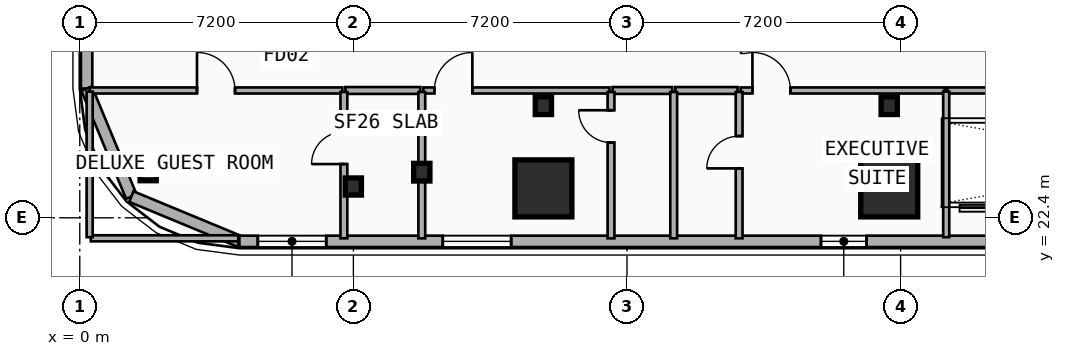
"""IFC4 building model, lengths in metres.
Left out: names, types, materials, properties, quantities, classifications, styles, units other than length and angle.
Written with IfcOpenShell. Run it as: python <this file> out.ifc"""

import sys

from ifc_helpers import new_model, si_unit, direction, frame, frame_2d, origin, origin_2d, place, context, subcontext, project, spatial, rectangle, i_section, extrude, element, fill, save


model = new_model("IFC4")
c1 = context("Model", 3, precision=1e-05, world=origin(), true_north=direction((0.0, 1.0)))
c2 = subcontext(c1, "Body", "Model", "MODEL_VIEW")
j1 = project(units=[si_unit("LENGTHUNIT", "METRE"), si_unit("PLANEANGLEUNIT", "RADIAN")], contexts=[c1])
p1 = place(None, origin())
s1 = spatial("IfcSite", under=j1, at=p1, CompositionType="ELEMENT")
p2 = place(p1, origin())
s2 = spatial("IfcBuilding", under=s1, at=p2, CompositionType="ELEMENT")
p3 = place(p2, frame((0.0, 0.0, 32.5)))
s3 = spatial("IfcBuildingStorey", under=s2, at=p3, CompositionType="ELEMENT", Elevation=32.5)
for number, where, z_axis, x_axis in (
    (1, (12.2, 25.35, 0.0), (0.0, 0.0, 1.0), (1.0, 0.0, 0.0)),
    (2, (21.3, 25.35, 0.0), (0.0, 0.0, 1.0), (1.0, 0.0, 0.0)),
):
    element("IfcColumn", number, at=place(p3, frame(where, z_axis=z_axis, x_axis=x_axis)), inside=s3, PredefinedType="COLUMN", context=c2, shape_type="SweptSolid", body=[
        extrude(i_section(OverallWidth=0.428, OverallDepth=0.465, WebThickness=0.045, FlangeThickness=0.073, FilletRadius=0.015, at=origin_2d()), origin(), (0.0, 0.0, 1.0), 3.5),
    ])
for number, where, z_axis, x_axis in (
    (3, (12.2, 23.283, 0.0), (0.0, -0.09, 0.996), (1.0, 0.0, 0.0)),
    (4, (21.3, 23.283, 0.0), (0.0, -0.09, 0.996), (1.0, 0.0, 0.0)),
):
    element("IfcColumn", number, at=place(p3, frame(where, z_axis=z_axis, x_axis=x_axis)), inside=s3, PredefinedType="COLUMN", context=c2, shape_type="SweptSolid", body=[
        extrude(rectangle(XDim=1.5, YDim=1.5, at=origin_2d()), origin(), (0.0, 0.0, 1.0), 3.514),
    ])
p4 = place(p3, frame((9.0, 23.6, 0.0), z_axis=(0.0, 0.0, 1.0), x_axis=(1.0, 0.0, 0.0)))
e5 = element("IfcColumn", 5, at=p4, inside=s3, PredefinedType="COLUMN", context=c2, shape_type="SweptSolid", body=[
    extrude(i_section(OverallWidth=0.428, OverallDepth=0.465, WebThickness=0.045, FlangeThickness=0.073, FilletRadius=0.015, at=origin_2d()), origin(), (0.0, 0.0, 1.0), 3.5),
])
p5 = place(p3, frame((1.8, 23.6, 0.0), z_axis=(0.0, 0.0, 1.0), x_axis=(1.0, 0.0, 0.0)))
e6 = element("IfcColumn", 6, at=p5, inside=s3, PredefinedType="COLUMN", context=c2, shape_type="SweptSolid", body=[
    extrude(i_section(OverallWidth=0.424, OverallDepth=0.45, WebThickness=0.041, FlangeThickness=0.065, FilletRadius=0.015, at=origin_2d()), origin(), (0.0, 0.0, 1.0), 3.5),
])
p6 = place(p3, frame((7.2, 23.32, 0.0), z_axis=(0.0, -0.079891690793, 0.996803550226), x_axis=(1.0, 0.0, 0.0)))
e7 = element("IfcColumn", 7, at=p6, inside=s3, PredefinedType="COLUMN", context=c2, shape_type="SweptSolid", body=[
    extrude(i_section(OverallWidth=0.424, OverallDepth=0.45, WebThickness=0.041, FlangeThickness=0.065, FilletRadius=0.015, at=origin_2d()), origin(), (0.0, 0.0, 1.0), 3.511),
])
p7 = place(p3, frame((0.18, 25.8, 0.0), z_axis=(0.0, 0.0, 1.0), x_axis=(0.0, 1.0, 0.0)))
e8 = element("IfcWall", 8, at=p7, inside=s3, PredefinedType="SOLIDWALL", context=c2, shape_type="SweptSolid", body=[
    extrude(rectangle(XDim=15.2, YDim=0.3, at=frame_2d((7.6, 0.0))), origin(), (0.0, 0.0, 1.0), 3.24),
])
p8 = place(p7, frame((2.67, 0.0, 0.48)))
e9 = element("IfcOpeningElement", 9, at=p8, cuts=e8, PredefinedType="OPENING", context=c2, shape_type="SweptSolid", body=[
    extrude(rectangle(XDim=1.4, YDim=1.8, at=frame_2d((0.7, 0.9))), frame((0.0, 0.16, 0.0), z_axis=(0.0, -1.0, 0.0), x_axis=(1.0, 0.0, 0.0)), (0.0, 0.0, 1.0), 0.32),
])
p9 = place(p7, frame((7.709, 0.0, 0.48)))
e10 = element("IfcOpeningElement", 10, at=p9, cuts=e8, PredefinedType="OPENING", context=c2, shape_type="SweptSolid", body=[
    extrude(rectangle(XDim=1.4, YDim=1.8, at=frame_2d((0.7, 0.9))), frame((0.0, 0.16, 0.0), z_axis=(0.0, -1.0, 0.0), x_axis=(1.0, 0.0, 0.0)), (0.0, 0.0, 1.0), 0.32),
])
for number, where, z_axis, x_axis in (
    (11, (1.357, 22.958, 0.0), (0.0, 0.0, 1.0), (-0.383, 0.924, 0.0)),
    (12, (4.2, 21.78, 0.0), (0.0, 0.0, 1.0), (-0.924, 0.383, 0.0)),
):
    element("IfcWall", number, at=place(p3, frame(where, z_axis=z_axis, x_axis=x_axis)), inside=s3, PredefinedType="SOLIDWALL", context=c2, shape_type="SweptSolid", body=[
        extrude(rectangle(XDim=3.077, YDim=0.3, at=frame_2d((1.538, 0.0))), origin(), (0.0, 0.0, 1.0), 3.24),
    ])
p10 = place(p3, frame((53.4, 21.78, 0.0), z_axis=(0.0, 0.0, 1.0), x_axis=(-1.0, 0.0, 0.0)))
e13 = element("IfcWall", 13, at=p10, inside=s3, PredefinedType="SOLIDWALL", context=c2, shape_type="SweptSolid", body=[
    extrude(rectangle(XDim=49.2, YDim=0.3, at=frame_2d((24.6, 0.0))), origin(), (0.0, 0.0, 1.0), 3.24),
])
p11 = place(p10, frame((46.915, 0.0, 0.65)))
e14 = element("IfcOpeningElement", 14, at=p11, cuts=e13, PredefinedType="OPENING", context=c2, shape_type="SweptSolid", body=[
    extrude(rectangle(XDim=1.8, YDim=1.8, at=frame_2d((0.9, 0.9))), frame((0.0, 0.16, 0.0), z_axis=(0.0, -1.0, 0.0), x_axis=(1.0, 0.0, 0.0)), (0.0, 0.0, 1.0), 0.32),
])
p12 = place(p10, frame((42.048, 0.0, 0.65)))
e15 = element("IfcOpeningElement", 15, at=p12, cuts=e13, PredefinedType="OPENING", context=c2, shape_type="SweptSolid", body=[
    extrude(rectangle(XDim=1.8, YDim=1.8, at=frame_2d((0.9, 0.9))), frame((0.0, 0.16, 0.0), z_axis=(0.0, -1.0, 0.0), x_axis=(1.0, 0.0, 0.0)), (0.0, 0.0, 1.0), 0.32),
])
p13 = place(p10, frame((32.696, 0.0, 0.48)))
e16 = element("IfcOpeningElement", 16, at=p13, cuts=e13, PredefinedType="OPENING", context=c2, shape_type="SweptSolid", body=[
    extrude(rectangle(XDim=1.2, YDim=1.5, at=frame_2d((0.6, 0.75))), frame((0.0, 0.16, 0.0), z_axis=(0.0, -1.0, 0.0), x_axis=(1.0, 0.0, 0.0)), (0.0, 0.0, 1.0), 0.32),
])
p14 = place(p10, frame((15.239, 0.0, 1.22)))
e17 = element("IfcOpeningElement", 17, at=p14, cuts=e13, PredefinedType="OPENING", context=c2, shape_type="SweptSolid", body=[
    extrude(rectangle(XDim=1.1, YDim=1.05, at=frame_2d((0.55, 0.525))), frame((0.0, 0.16, 0.0), z_axis=(0.0, -1.0, 0.0), x_axis=(1.0, 0.0, 0.0)), (0.0, 0.0, 1.0), 0.32),
])
p15 = place(p10, frame((5.352, 0.0, 0.65)))
e18 = element("IfcOpeningElement", 18, at=p15, cuts=e13, PredefinedType="OPENING", context=c2, shape_type="SweptSolid", body=[
    extrude(rectangle(XDim=1.8, YDim=1.8, at=frame_2d((0.9, 0.9))), frame((0.0, 0.16, 0.0), z_axis=(0.0, -1.0, 0.0), x_axis=(1.0, 0.0, 0.0)), (0.0, 0.0, 1.0), 0.32),
])
p16 = place(p10, frame((0.485, 0.0, 0.65)))
e19 = element("IfcOpeningElement", 19, at=p16, cuts=e13, PredefinedType="OPENING", context=c2, shape_type="SweptSolid", body=[
    extrude(rectangle(XDim=1.8, YDim=1.8, at=frame_2d((0.9, 0.9))), frame((0.0, 0.16, 0.0), z_axis=(0.0, -1.0, 0.0), x_axis=(1.0, 0.0, 0.0)), (0.0, 0.0, 1.0), 0.32),
])
p17 = place(p3, frame((0.26, 25.75, 0.0), z_axis=(0.0, 0.0, 1.0), x_axis=(1.0, 0.0, 0.0)))
e20 = element("IfcWall", 20, at=p17, inside=s3, PredefinedType="PARTITIONING", context=c2, shape_type="SweptSolid", body=[
    extrude(rectangle(XDim=6.65, YDim=0.16, at=frame_2d((3.325, 0.0))), origin(), (0.0, 0.0, 1.0), 2.57),
])
p18 = place(p17, frame((2.825, 0.0, 0.0)))
e21 = element("IfcOpeningElement", 21, at=p18, cuts=e20, PredefinedType="OPENING", context=c2, shape_type="SweptSolid", body=[
    extrude(rectangle(XDim=1.0, YDim=2.15, at=frame_2d((0.5, 1.075))), frame((0.0, 0.09, 0.0), z_axis=(0.0, -1.0, 0.0), x_axis=(1.0, 0.0, 0.0)), (0.0, 0.0, 1.0), 0.18),
])
p19 = place(p3, frame((6.99, 25.75, 0.0), z_axis=(0.0, 0.0, 1.0), x_axis=(1.0, 0.0, 0.0)))
e22 = element("IfcWall", 22, at=p19, inside=s3, PredefinedType="PLUMBINGWALL", context=c2, shape_type="SweptSolid", body=[
    extrude(rectangle(XDim=1.97, YDim=0.18, at=frame_2d((0.985, 0.0))), origin(), (0.0, 0.0, 1.0), 2.57),
])
p20 = place(p3, frame((9.04, 25.75, 0.0), z_axis=(0.0, 0.0, 1.0), x_axis=(1.0, 0.0, 0.0)))
e23 = element("IfcWall", 23, at=p20, inside=s3, PredefinedType="PARTITIONING", context=c2, shape_type="SweptSolid", body=[
    extrude(rectangle(XDim=4.899, YDim=0.16, at=frame_2d((2.449, 0.0))), origin(), (0.0, 0.0, 1.0), 2.28),
])
p21 = place(p20, frame((0.291, 0.0, 0.0)))
e24 = element("IfcOpeningElement", 24, at=p21, cuts=e23, PredefinedType="OPENING", context=c2, shape_type="SweptSolid", body=[
    extrude(rectangle(XDim=1.0, YDim=2.15, at=frame_2d((0.5, 1.075))), frame((0.0, 0.09, 0.0), z_axis=(0.0, -1.0, 0.0), x_axis=(1.0, 0.0, 0.0)), (0.0, 0.0, 1.0), 0.18),
])
p22 = place(p3, frame((14.019, 25.75, 0.0), z_axis=(0.0, 0.0, 1.0), x_axis=(1.0, 0.0, 0.0)))
e25 = element("IfcWall", 25, at=p22, inside=s3, PredefinedType="PLUMBINGWALL", context=c2, shape_type="SweptSolid", body=[
    extrude(rectangle(XDim=1.57, YDim=0.18, at=frame_2d((0.785, 0.0))), origin(), (0.0, 0.0, 1.0), 3.24),
])
p23 = place(p3, frame((17.39, 25.75, 0.0), z_axis=(0.0, 0.0, 1.0), x_axis=(1.0, 0.0, 0.0)))
e26 = element("IfcWall", 26, at=p23, inside=s3, PredefinedType="PARTITIONING", context=c2, shape_type="SweptSolid", body=[
    extrude(rectangle(XDim=5.37, YDim=0.16, at=frame_2d((2.685, 0.0))), origin(), (0.0, 0.0, 1.0), 2.28),
])
p24 = place(p23, frame((0.31, 0.0, 0.0)))
e27 = element("IfcOpeningElement", 27, at=p24, cuts=e26, PredefinedType="OPENING", context=c2, shape_type="SweptSolid", body=[
    extrude(rectangle(XDim=1.0, YDim=2.15, at=frame_2d((0.5, 1.075))), frame((0.0, 0.09, 0.0), z_axis=(0.0, -1.0, 0.0), x_axis=(1.0, 0.0, 0.0)), (0.0, 0.0, 1.0), 0.18),
])
p25 = place(p3, frame((15.669, 25.75, 0.0), z_axis=(0.0, 0.0, 1.0), x_axis=(1.0, 0.0, 0.0)))
e28 = element("IfcWall", 28, at=p25, inside=s3, PredefinedType="PLUMBINGWALL", context=c2, shape_type="SweptSolid", body=[
    extrude(rectangle(XDim=1.641, YDim=0.18, at=frame_2d((0.821, 0.0))), origin(), (0.0, 0.0, 1.0), 3.24),
])
p26 = place(p3, frame((6.95, 21.86, 0.0), z_axis=(0.0, 0.0, 1.0), x_axis=(0.0, 1.0, 0.0)))
e29 = element("IfcWall", 29, at=p26, inside=s3, PredefinedType="PLUMBINGWALL", context=c2, shape_type="SweptSolid", body=[
    extrude(rectangle(XDim=3.85, YDim=0.18, at=frame_2d((1.925, 0.0))), origin(), (0.0, 0.0, 1.0), 2.57),
])
p27 = place(p26, frame((1.953, 0.0, 0.0)))
e30 = element("IfcOpeningElement", 30, at=p27, cuts=e29, PredefinedType="OPENING", context=c2, shape_type="SweptSolid", body=[
    extrude(rectangle(XDim=0.85, YDim=2.1, at=frame_2d((0.425, 1.05))), frame((0.0, 0.1, 0.0), z_axis=(0.0, -1.0, 0.0), x_axis=(1.0, 0.0, 0.0)), (0.0, 0.0, 1.0), 0.2),
])
p28 = place(p3, frame((9.0, 21.86, 0.0), z_axis=(0.0, 0.0, 1.0), x_axis=(0.0, 1.0, 0.0)))
e31 = element("IfcWall", 31, at=p28, inside=s3, PredefinedType="PLUMBINGWALL", context=c2, shape_type="SweptSolid", body=[
    extrude(rectangle(XDim=3.85, YDim=0.18, at=frame_2d((1.925, 0.0))), origin(), (0.0, 0.0, 1.0), 2.72),
])
p29 = place(p3, frame((13.979, 21.86, 0.0), z_axis=(0.0, 0.0, 1.0), x_axis=(0.0, 1.0, 0.0)))
e32 = element("IfcWall", 32, at=p29, inside=s3, PredefinedType="PLUMBINGWALL", context=c2, shape_type="SweptSolid", body=[
    extrude(rectangle(XDim=3.85, YDim=0.18, at=frame_2d((1.925, 0.0))), origin(), (0.0, 0.0, 1.0), 2.82),
])
p30 = place(p29, frame((2.52, 0.0, 0.0)))
e33 = element("IfcOpeningElement", 33, at=p30, cuts=e32, PredefinedType="OPENING", context=c2, shape_type="SweptSolid", body=[
    extrude(rectangle(XDim=0.85, YDim=2.1, at=frame_2d((0.425, 1.05))), frame((0.0, 0.1, 0.0), z_axis=(0.0, -1.0, 0.0), x_axis=(1.0, 0.0, 0.0)), (0.0, 0.0, 1.0), 0.2),
])
p31 = place(p3, frame((15.629, 21.86, 0.0), z_axis=(0.0, 0.0, 1.0), x_axis=(0.0, 1.0, 0.0)))
e34 = element("IfcWall", 34, at=p31, inside=s3, PredefinedType="PLUMBINGWALL", context=c2, shape_type="SweptSolid", body=[
    extrude(rectangle(XDim=3.85, YDim=0.18, at=frame_2d((1.925, 0.0))), origin(), (0.0, 0.0, 1.0), 2.82),
])
p32 = place(p3, frame((17.35, 21.86, 0.0), z_axis=(0.0, 0.0, 1.0), x_axis=(0.0, 1.0, 0.0)))
e35 = element("IfcWall", 35, at=p32, inside=s3, PredefinedType="PLUMBINGWALL", context=c2, shape_type="SweptSolid", body=[
    extrude(rectangle(XDim=3.85, YDim=0.18, at=frame_2d((1.925, 0.0))), origin(), (0.0, 0.0, 1.0), 2.82),
])
p33 = place(p32, frame((1.84, 0.0, 0.0)))
e36 = element("IfcOpeningElement", 36, at=p33, cuts=e35, PredefinedType="OPENING", context=c2, shape_type="SweptSolid", body=[
    extrude(rectangle(XDim=0.85, YDim=2.1, at=frame_2d((0.425, 1.05))), frame((0.0, 0.1, 0.0), z_axis=(0.0, -1.0, 0.0), x_axis=(1.0, 0.0, 0.0)), (0.0, 0.0, 1.0), 0.2),
])
p34 = place(p3, frame((22.83, 25.75, 0.0), z_axis=(0.0, 0.0, 1.0), x_axis=(1.0, 0.0, 0.0)))
e37 = element("IfcWall", 37, at=p34, inside=s3, PredefinedType="PARTITIONING", context=c2, shape_type="SweptSolid", body=[
    extrude(rectangle(XDim=11.94, YDim=0.16, at=frame_2d((5.97, 0.0))), origin(), (0.0, 0.0, 1.0), 3.24),
])
p35 = place(p3, frame((0.29, 21.86, 0.0), z_axis=(0.0, 0.0, 1.0), x_axis=(1.0, 0.0, 0.0)))
e38 = element("IfcWall", 38, at=p35, inside=s3, PredefinedType="PARTITIONING", context=c2, shape_type="SweptSolid", body=[
    extrude(rectangle(XDim=3.88, YDim=0.16, at=frame_2d((1.94, 0.0))), origin(), (0.0, 0.0, 1.0), 3.24),
])
p36 = place(p3, frame((0.26, 21.89, 0.0), z_axis=(0.0, 0.0, 1.0), x_axis=(0.0, 1.0, 0.0)))
e39 = element("IfcWall", 39, at=p36, inside=s3, PredefinedType="PARTITIONING", context=c2, shape_type="SweptSolid", body=[
    extrude(rectangle(XDim=3.83, YDim=0.16, at=frame_2d((1.915, 0.0))), origin(), (0.0, 0.0, 1.0), 3.24),
])
p37 = place(p3, frame((22.8, 21.89, 0.0), z_axis=(0.0, 0.0, 1.0), x_axis=(0.0, 1.0, 0.0)))
e40 = element("IfcWall", 40, at=p37, inside=s3, PredefinedType="PARTITIONING", context=c2, shape_type="SweptSolid", body=[
    extrude(rectangle(XDim=3.83, YDim=0.16, at=frame_2d((1.915, 0.0))), origin(), (0.0, 0.0, 1.0), 2.82),
])
p38 = place(p11, origin())
e41 = element("IfcWindow", 41, at=p38, inside=s3, PartitioningType="SINGLE_PANEL", PredefinedType="WINDOW", context=c2, shape_type="SweptSolid", body=[
    extrude(rectangle(XDim=1.8, YDim=1.8, at=frame_2d((0.9, 0.9))), frame((0.0, 0.03, 0.0), z_axis=(0.0, -1.0, 0.0), x_axis=(1.0, 0.0, 0.0)), (0.0, 0.0, 1.0), 0.06),
])
fill(e14, e41)
p39 = place(p12, origin())
e42 = element("IfcWindow", 42, at=p39, inside=s3, PartitioningType="SINGLE_PANEL", PredefinedType="WINDOW", context=c2, shape_type="SweptSolid", body=[
    extrude(rectangle(XDim=1.8, YDim=1.8, at=frame_2d((0.9, 0.9))), frame((0.0, 0.03, 0.0), z_axis=(0.0, -1.0, 0.0), x_axis=(1.0, 0.0, 0.0)), (0.0, 0.0, 1.0), 0.06),
])
fill(e15, e42)
p40 = place(p13, origin())
e43 = element("IfcWindow", 43, at=p40, inside=s3, PartitioningType="SINGLE_PANEL", PredefinedType="WINDOW", context=c2, shape_type="SweptSolid", body=[
    extrude(rectangle(XDim=1.2, YDim=1.5, at=frame_2d((0.6, 0.75))), frame((0.0, 0.03, 0.0), z_axis=(0.0, -1.0, 0.0), x_axis=(1.0, 0.0, 0.0)), (0.0, 0.0, 1.0), 0.06),
])
fill(e16, e43)
p41 = place(p18, origin())
e44 = element("IfcDoor", 44, at=p41, inside=s3, OperationType="SINGLE_SWING_LEFT", PredefinedType="DOOR", context=c2, shape_type="SweptSolid", body=[
    extrude(rectangle(XDim=1.0, YDim=2.15, at=frame_2d((0.5, 1.075))), frame((0.0, 0.025, 0.0), z_axis=(0.0, -1.0, 0.0), x_axis=(1.0, 0.0, 0.0)), (0.0, 0.0, 1.0), 0.05),
])
fill(e21, e44)
p42 = place(p21, origin())
e45 = element("IfcDoor", 45, at=p42, inside=s3, OperationType="SINGLE_SWING_RIGHT", PredefinedType="DOOR", context=c2, shape_type="SweptSolid", body=[
    extrude(rectangle(XDim=1.0, YDim=2.15, at=frame_2d((0.5, 1.075))), frame((0.0, 0.025, 0.0), z_axis=(0.0, -1.0, 0.0), x_axis=(1.0, 0.0, 0.0)), (0.0, 0.0, 1.0), 0.05),
])
fill(e24, e45)
p43 = place(p24, origin())
e46 = element("IfcDoor", 46, at=p43, inside=s3, OperationType="SINGLE_SWING_LEFT", PredefinedType="DOOR", context=c2, shape_type="SweptSolid", body=[
    extrude(rectangle(XDim=1.0, YDim=2.15, at=frame_2d((0.5, 1.075))), frame((0.0, 0.025, 0.0), z_axis=(0.0, -1.0, 0.0), x_axis=(1.0, 0.0, 0.0)), (0.0, 0.0, 1.0), 0.05),
])
fill(e27, e46)
p44 = place(p27, origin())
e47 = element("IfcDoor", 47, at=p44, inside=s3, OperationType="SINGLE_SWING_LEFT", PredefinedType="DOOR", context=c2, shape_type="SweptSolid", body=[
    extrude(rectangle(XDim=0.85, YDim=2.1, at=frame_2d((0.425, 1.05))), frame((0.0, 0.025, 0.0), z_axis=(0.0, -1.0, 0.0), x_axis=(1.0, 0.0, 0.0)), (0.0, 0.0, 1.0), 0.05),
])
fill(e30, e47)
p45 = place(p30, origin())
e48 = element("IfcDoor", 48, at=p45, inside=s3, OperationType="SINGLE_SWING_RIGHT", PredefinedType="DOOR", context=c2, shape_type="SweptSolid", body=[
    extrude(rectangle(XDim=0.85, YDim=2.1, at=frame_2d((0.425, 1.05))), frame((0.0, 0.025, 0.0), z_axis=(0.0, -1.0, 0.0), x_axis=(1.0, 0.0, 0.0)), (0.0, 0.0, 1.0), 0.05),
])
fill(e33, e48)
p46 = place(p33, origin())
e49 = element("IfcDoor", 49, at=p46, inside=s3, OperationType="SINGLE_SWING_LEFT", PredefinedType="DOOR", context=c2, shape_type="SweptSolid", body=[
    extrude(rectangle(XDim=0.85, YDim=2.1, at=frame_2d((0.425, 1.05))), frame((0.0, 0.025, 0.0), z_axis=(0.0, -1.0, 0.0), x_axis=(1.0, 0.0, 0.0)), (0.0, 0.0, 1.0), 0.05),
])
fill(e36, e49)
save(model, sys.argv[1])
